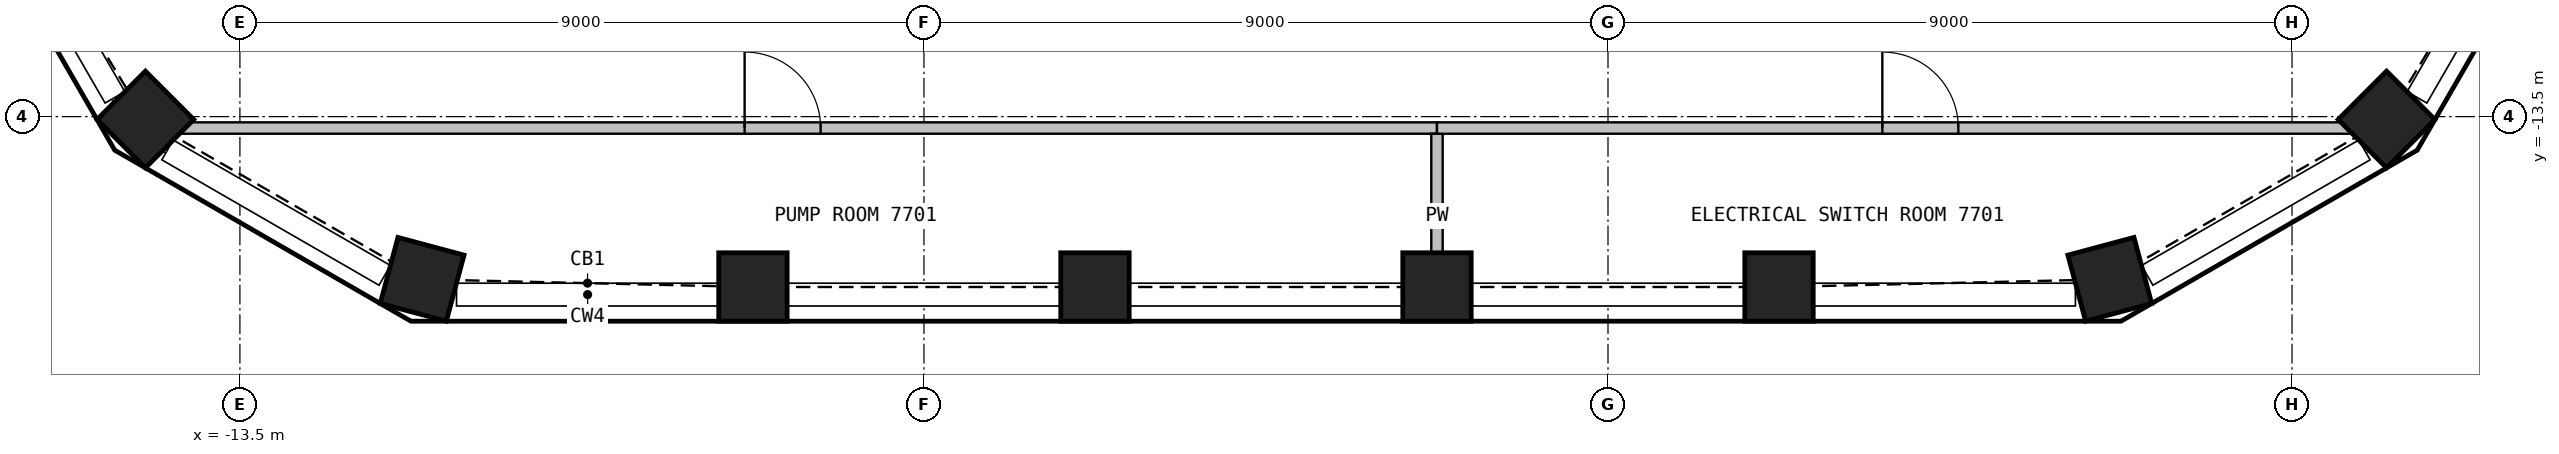
"""IFC4 building model, lengths in metres.
Left out: names, types, materials, properties, quantities, classifications, styles, units other than length and angle.
Written with IfcOpenShell. Run it as: python <this file> out.ifc"""

import sys

from ifc_helpers import new_model, si_unit, direction, frame, frame_2d, origin, origin_2d, place, context, subcontext, project, spatial, rectangle, extrude, element, fill, save


model = new_model("IFC4")
c1 = context("Model", 3, precision=1e-05, world=origin(), true_north=direction((0.0, 1.0)))
c2 = subcontext(c1, "Body", "Model", "MODEL_VIEW")
j1 = project(units=[si_unit("LENGTHUNIT", "METRE"), si_unit("PLANEANGLEUNIT", "RADIAN")], contexts=[c1])
p1 = place(None, origin())
s1 = spatial("IfcSite", under=j1, at=p1, CompositionType="ELEMENT")
p2 = place(p1, origin())
s2 = spatial("IfcBuilding", under=s1, at=p2, CompositionType="ELEMENT")
p3 = place(p2, frame((0.0, 0.0, 309.9)))
s3 = spatial("IfcBuildingStorey", under=s2, at=p3, CompositionType="ELEMENT", Elevation=309.9)
for number, where, z_axis, x_axis in (
    (1, (-11.102, -15.64, 0.0), (0.0, 0.0, 1.0), (0.966, -0.259, 0.0)),
    (2, (-6.75, -15.741, 0.0), (0.0, 0.0, 1.0), (1.0, 0.0, 0.0)),
    (3, (-2.25, -15.741, 0.0), (0.0, 0.0, 1.0), (1.0, 0.0, 0.0)),
    (4, (2.25, -15.741, 0.0), (0.0, 0.0, 1.0), (1.0, 0.0, 0.0)),
    (5, (6.75, -15.741, 0.0), (0.0, 0.0, 1.0), (1.0, 0.0, 0.0)),
    (6, (11.102, -15.64, 0.0), (0.0, 0.0, 1.0), (0.966, 0.259, 0.0)),
    (7, (14.744, -13.538, 0.0), (0.0, 0.0, 1.0), (0.707, 0.707, 0.0)),
    (8, (-14.744, -13.538, 0.0), (0.0, 0.0, 1.0), (0.707, -0.707, 0.0)),
):
    element("IfcColumn", number, at=place(p3, frame(where, z_axis=z_axis, x_axis=x_axis)), inside=s3, PredefinedType="COLUMN", context=c2, shape_type="SweptSolid", body=[
        extrude(rectangle(XDim=0.9, YDim=0.9, at=origin_2d()), origin(), (0.0, 0.0, 1.0), 8.55),
    ])
p4 = place(p3, frame((-14.969, -13.65, 0.0), z_axis=(0.0, 0.0, 1.0), x_axis=(1.0, 0.0, 0.0)))
e9 = element("IfcWall", 9, at=p4, inside=s3, PredefinedType="PARTITIONING", context=c2, shape_type="SweptSolid", body=[
    extrude(rectangle(XDim=17.219, YDim=0.15, at=frame_2d((8.609, 0.0))), origin(), (0.0, 0.0, 1.0), 8.55),
])
p5 = place(p4, frame((8.11, 0.0, 0.0)))
e10 = element("IfcOpeningElement", 10, at=p5, cuts=e9, PredefinedType="OPENING", context=c2, shape_type="SweptSolid", body=[
    extrude(rectangle(XDim=1.0, YDim=2.1, at=frame_2d((0.5, 1.05))), frame((0.0, 0.085, 0.0), z_axis=(0.0, -1.0, 0.0), x_axis=(1.0, 0.0, 0.0)), (0.0, 0.0, 1.0), 0.17),
])
p6 = place(p3, frame((2.25, -13.725, 0.0), z_axis=(0.0, 0.0, 1.0), x_axis=(0.0, -1.0, 0.0)))
e11 = element("IfcWall", 11, at=p6, inside=s3, PredefinedType="PARTITIONING", context=c2, shape_type="SweptSolid", body=[
    extrude(rectangle(XDim=2.166, YDim=0.15, at=frame_2d((1.083, 0.0))), origin(), (0.0, 0.0, 1.0), 8.55),
])
p7 = place(p3, frame((2.25, -13.65, 0.0), z_axis=(0.0, 0.0, 1.0), x_axis=(1.0, 0.0, 0.0)))
e12 = element("IfcWall", 12, at=p7, inside=s3, PredefinedType="PARTITIONING", context=c2, shape_type="SweptSolid", body=[
    extrude(rectangle(XDim=12.719, YDim=0.15, at=frame_2d((6.359, 0.0))), origin(), (0.0, 0.0, 1.0), 8.55),
])
p8 = place(p7, frame((5.86, 0.0, 0.0)))
e13 = element("IfcOpeningElement", 13, at=p8, cuts=e12, PredefinedType="OPENING", context=c2, shape_type="SweptSolid", body=[
    extrude(rectangle(XDim=1.0, YDim=2.1, at=frame_2d((0.5, 1.05))), frame((0.0, 0.085, 0.0), z_axis=(0.0, -1.0, 0.0), x_axis=(1.0, 0.0, 0.0)), (0.0, 0.0, 1.0), 0.17),
])
p9 = place(p5, origin())
e14 = element("IfcDoor", 14, at=p9, inside=s3, OperationType="SINGLE_SWING_RIGHT", PredefinedType="DOOR", context=c2, shape_type="SweptSolid", body=[
    extrude(rectangle(XDim=1.0, YDim=2.1, at=frame_2d((0.5, 1.05))), frame((0.0, 0.025, 0.0), z_axis=(0.0, -1.0, 0.0), x_axis=(1.0, 0.0, 0.0)), (0.0, 0.0, 1.0), 0.05),
])
fill(e10, e14)
p10 = place(p8, origin())
e15 = element("IfcDoor", 15, at=p10, inside=s3, OperationType="SINGLE_SWING_RIGHT", PredefinedType="DOOR", context=c2, shape_type="SweptSolid", body=[
    extrude(rectangle(XDim=1.0, YDim=2.1, at=frame_2d((0.5, 1.05))), frame((0.0, 0.025, 0.0), z_axis=(0.0, -1.0, 0.0), x_axis=(1.0, 0.0, 0.0)), (0.0, 0.0, 1.0), 0.05),
])
fill(e13, e15)
save(model, sys.argv[1])
